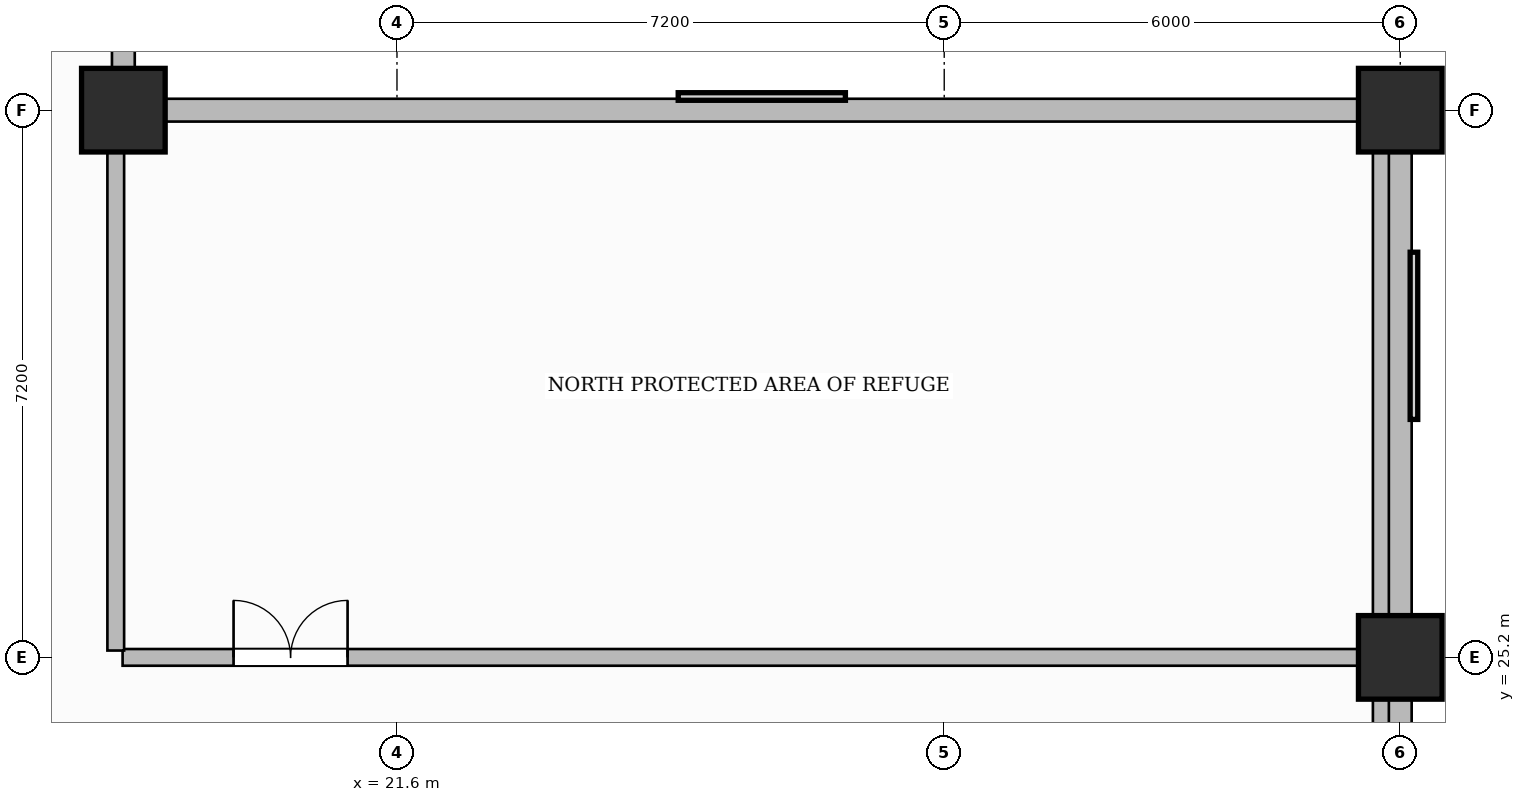
"""IFC4 building model, lengths in metres.
Left out: names, types, materials, properties, quantities, classifications, styles, units other than length and angle.
Written with IfcOpenShell. Run it as: python <this file> out.ifc"""

import sys

from ifc_helpers import new_model, si_unit, direction, frame, frame_2d, origin, origin_2d, place, context, subcontext, project, spatial, rectangle, extrude, source, transform, mapped, element, fill, save


model = new_model("IFC4")
c1 = context("Model", 3, precision=1e-05, world=origin(), true_north=direction((0.0, 1.0)))
c2 = subcontext(c1, "Body", "Model", "MODEL_VIEW")
j1 = project(units=[si_unit("LENGTHUNIT", "METRE"), si_unit("PLANEANGLEUNIT", "RADIAN")], contexts=[c1])
p1 = place(None, origin())
s1 = spatial("IfcSite", under=j1, at=p1, CompositionType="ELEMENT")
p2 = place(p1, origin())
s2 = spatial("IfcBuilding", under=s1, at=p2, CompositionType="ELEMENT")
p3 = place(p2, frame((0.0, 0.0, 106.4)))
s3 = spatial("IfcBuildingStorey", under=s2, at=p3, CompositionType="ELEMENT", Elevation=106.4)
m1 = source(origin(), c2, "Body", "SweptSolid", [
    extrude(rectangle(XDim=1.1, YDim=1.1, at=origin_2d()), origin(), (0.0, 0.0, 1.0), 5.4),
])
for number, where, z_axis, x_axis in (
    (1, (34.8, 25.2, 0.0), (0.0, 0.0, 1.0), (1.0, 0.0, 0.0)),
    (2, (34.8, 32.4, 0.0), (0.0, 0.0, 1.0), (1.0, 0.0, 0.0)),
    (3, (18.0, 32.4, 0.0), (0.0, 0.0, 1.0), (1.0, 0.0, 0.0)),
):
    element("IfcColumn", number, at=place(p3, frame(where, z_axis=z_axis, x_axis=x_axis)), inside=s3, PredefinedType="COLUMN", context=c2, shape_type="MappedRepresentation", body=[
        mapped(m1, transform((0.0, 0.0, 0.0), scale=1.0)),
    ])
p4 = place(p3, frame((17.99, 25.2, 0.0), z_axis=(0.0, 0.0, 1.0), x_axis=(1.0, 0.0, 0.0)))
e4 = element("IfcWall", 4, at=p4, inside=s3, PredefinedType="PARTITIONING", context=c2, shape_type="SweptSolid", body=[
    extrude(rectangle(XDim=16.47, YDim=0.22, at=frame_2d((8.235, 0.0))), origin(), (0.0, 0.0, 1.0), 5.15),
])
p5 = place(p4, frame((1.46, 0.0, 0.0)))
e5 = element("IfcOpeningElement", 5, at=p5, cuts=e4, PredefinedType="OPENING", context=c2, shape_type="SweptSolid", body=[
    extrude(rectangle(XDim=1.5, YDim=2.2, at=frame_2d((0.75, 1.1))), frame((0.0, 0.12, 0.0), z_axis=(0.0, -1.0, 0.0), x_axis=(1.0, 0.0, 0.0)), (0.0, 0.0, 1.0), 0.24),
])
p6 = place(p3, frame((34.55, 21.69, 0.0), z_axis=(0.0, 0.0, 1.0), x_axis=(0.0, 1.0, 0.0)))
e6 = element("IfcWall", 6, at=p6, inside=s3, PredefinedType="PARTITIONING", context=c2, shape_type="SweptSolid", body=[
    extrude(rectangle(XDim=10.47, YDim=0.22, at=frame_2d((5.235, 0.0))), origin(), (0.0, 0.0, 1.0), 4.485),
])
p7 = place(p3, frame((17.9, 25.29, 0.0), z_axis=(0.0, 0.0, 1.0), x_axis=(0.0, 1.0, 0.0)))
e7 = element("IfcWall", 7, at=p7, inside=s3, PredefinedType="PARTITIONING", context=c2, shape_type="SweptSolid", body=[
    extrude(rectangle(XDim=6.87, YDim=0.22, at=frame_2d((3.435, 0.0))), origin(), (0.0, 0.0, 1.0), 5.15),
])
p8 = place(p3, frame((18.0, 32.4, 0.0), z_axis=(0.0, 0.0, 1.0), x_axis=(0.0, 1.0, 0.0)))
e8 = element("IfcWall", 8, at=p8, inside=s3, PredefinedType="SOLIDWALL", context=c2, shape_type="SweptSolid", body=[
    extrude(rectangle(XDim=14.35, YDim=0.3, at=frame_2d((7.175, 0.0))), origin(), (0.0, 0.0, 1.0), 5.15),
])
p9 = place(p3, frame((18.0, 32.4, 0.0), z_axis=(0.0, 0.0, 1.0), x_axis=(1.0, 0.0, 0.0)))
e9 = element("IfcWall", 9, at=p9, inside=s3, PredefinedType="SOLIDWALL", context=c2, shape_type="SweptSolid", body=[
    extrude(rectangle(XDim=16.8, YDim=0.3, at=frame_2d((8.4, 0.0))), origin(), (0.0, 0.0, 1.0), 4.335),
])
p10 = place(p3, frame((34.8, 21.65, 0.0), z_axis=(0.0, 0.0, 1.0), x_axis=(0.0, 1.0, 0.0)))
e10 = element("IfcWall", 10, at=p10, inside=s3, PredefinedType="SOLIDWALL", context=c2, shape_type="SweptSolid", body=[
    extrude(rectangle(XDim=10.75, YDim=0.3, at=frame_2d((5.375, 0.0))), origin(), (0.0, 0.0, 1.0), 4.485),
])
m2 = source(origin(), c2, "Body", "SweptSolid", [
    extrude(rectangle(XDim=1.5, YDim=2.2, at=frame_2d((0.75, 1.1))), frame((0.0, 0.025, 0.0), z_axis=(0.0, -1.0, 0.0), x_axis=(1.0, 0.0, 0.0)), (0.0, 0.0, 1.0), 0.05),
])
p11 = place(p5, origin())
e11 = element("IfcDoor", 11, at=p11, inside=s3, OperationType="DOUBLE_DOOR_SINGLE_SWING", PredefinedType="DOOR", context=c2, shape_type="MappedRepresentation", body=[
    mapped(m2, transform((0.0, 0.0, 0.0), scale=1.0)),
])
fill(e5, e11)
save(model, sys.argv[1])
